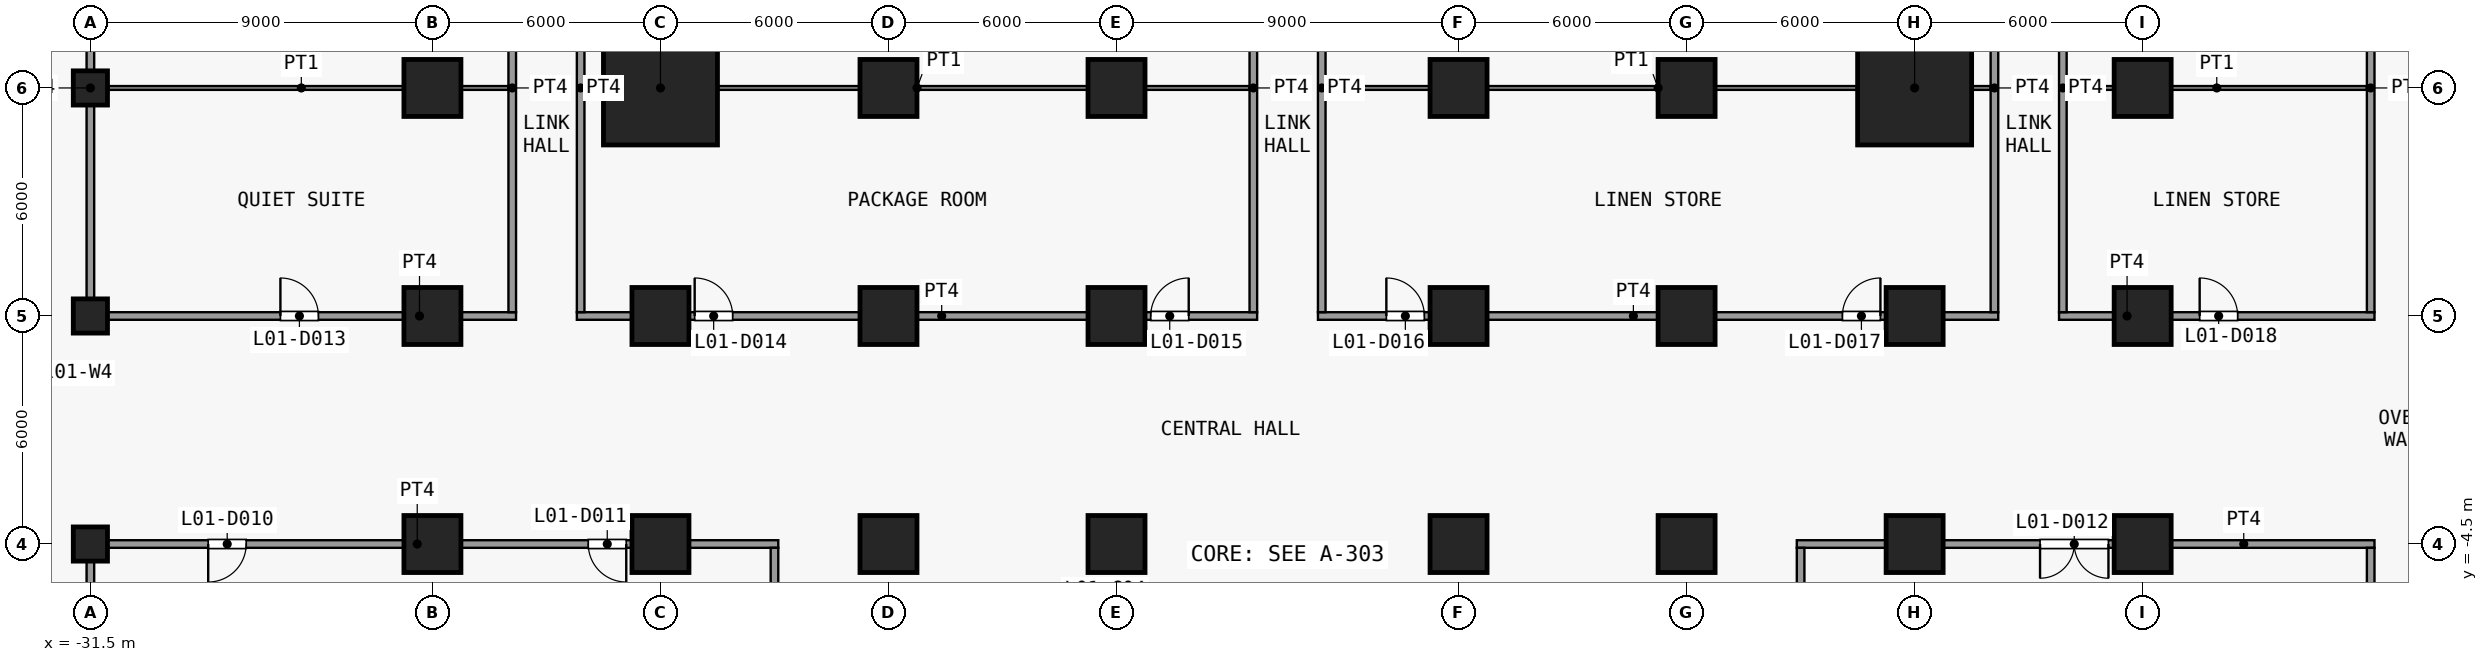
"""IFC4 building model, lengths in metres.
Left out: names, types, materials, properties, quantities, classifications, styles, units other than length and angle.
Written with IfcOpenShell. Run it as: python <this file> out.ifc"""

import sys

from ifc_helpers import new_model, si_unit, direction, frame, frame_2d, origin, origin_2d, place, context, subcontext, project, spatial, rectangle, extrude, element, fill, save


model = new_model("IFC4")
c1 = context("Model", 3, precision=1e-05, world=origin(), true_north=direction((0.0, 1.0)))
c2 = subcontext(c1, "Body", "Model", "MODEL_VIEW")
j1 = project(units=[si_unit("LENGTHUNIT", "METRE"), si_unit("PLANEANGLEUNIT", "RADIAN")], contexts=[c1])
p1 = place(None, origin())
s1 = spatial("IfcSite", under=j1, at=p1, CompositionType="ELEMENT")
p2 = place(p1, origin())
s2 = spatial("IfcBuilding", under=s1, at=p2, CompositionType="ELEMENT")
p3 = place(p2, frame((0.0, 0.0, 8.0)))
s3 = spatial("IfcBuildingStorey", under=s2, at=p3, CompositionType="ELEMENT", Elevation=8.0)
for number, where, z_axis, x_axis in (
    (1, (-31.5, -4.5, 0.0), (0.0, 0.0, 1.0), (1.0, 0.0, 0.0)),
    (2, (-31.5, 1.5, 0.0), (0.0, 0.0, 1.0), (1.0, 0.0, 0.0)),
    (3, (-31.5, 7.5, 0.0), (0.0, 0.0, 1.0), (1.0, 0.0, 0.0)),
):
    element("IfcColumn", number, at=place(p3, frame(where, z_axis=z_axis, x_axis=x_axis)), inside=s3, PredefinedType="COLUMN", context=c2, shape_type="SweptSolid", body=[
        extrude(rectangle(XDim=0.9, YDim=0.9, at=origin_2d()), origin(), (0.0, 0.0, 1.0), 5.5),
    ])
for number, where, z_axis, x_axis in (
    (4, (-22.5, -4.5, 0.0), (0.0, 0.0, 1.0), (1.0, 0.0, 0.0)),
    (5, (-22.5, 1.5, 0.0), (0.0, 0.0, 1.0), (1.0, 0.0, 0.0)),
    (6, (-22.5, 7.5, 0.0), (0.0, 0.0, 1.0), (1.0, 0.0, 0.0)),
    (7, (-16.5, -4.5, 0.0), (0.0, 0.0, 1.0), (1.0, 0.0, 0.0)),
    (8, (-16.5, 1.5, 0.0), (0.0, 0.0, 1.0), (1.0, 0.0, 0.0)),
):
    element("IfcColumn", number, at=place(p3, frame(where, z_axis=z_axis, x_axis=x_axis)), inside=s3, PredefinedType="COLUMN", context=c2, shape_type="SweptSolid", body=[
        extrude(rectangle(XDim=1.5, YDim=1.5, at=origin_2d()), origin(), (0.0, 0.0, 1.0), 5.5),
    ])
p4 = place(p3, frame((-16.5, 7.5, 0.0), z_axis=(0.0, 0.0, 1.0), x_axis=(1.0, 0.0, 0.0)))
e9 = element("IfcColumn", 9, at=p4, inside=s3, PredefinedType="COLUMN", context=c2, shape_type="SweptSolid", body=[
    extrude(rectangle(XDim=3.0, YDim=3.0, at=origin_2d()), origin(), (0.0, 0.0, 1.0), 5.5),
])
for number, where, z_axis, x_axis in (
    (10, (-10.5, -4.5, 0.0), (0.0, 0.0, 1.0), (1.0, 0.0, 0.0)),
    (11, (-10.5, 1.5, 0.0), (0.0, 0.0, 1.0), (1.0, 0.0, 0.0)),
    (12, (-10.5, 7.5, 0.0), (0.0, 0.0, 1.0), (1.0, 0.0, 0.0)),
    (13, (-4.5, -4.5, 0.0), (0.0, 0.0, 1.0), (1.0, 0.0, 0.0)),
    (14, (-4.5, 1.5, 0.0), (0.0, 0.0, 1.0), (1.0, 0.0, 0.0)),
    (15, (-4.5, 7.5, 0.0), (0.0, 0.0, 1.0), (1.0, 0.0, 0.0)),
    (16, (4.5, -4.5, 0.0), (0.0, 0.0, 1.0), (1.0, 0.0, 0.0)),
    (17, (4.5, 1.5, 0.0), (0.0, 0.0, 1.0), (1.0, 0.0, 0.0)),
    (18, (4.5, 7.5, 0.0), (0.0, 0.0, 1.0), (1.0, 0.0, 0.0)),
    (19, (10.5, -4.5, 0.0), (0.0, 0.0, 1.0), (1.0, 0.0, 0.0)),
    (20, (10.5, 1.5, 0.0), (0.0, 0.0, 1.0), (1.0, 0.0, 0.0)),
    (21, (10.5, 7.5, 0.0), (0.0, 0.0, 1.0), (1.0, 0.0, 0.0)),
    (22, (16.5, -4.5, 0.0), (0.0, 0.0, 1.0), (1.0, 0.0, 0.0)),
    (23, (16.5, 1.5, 0.0), (0.0, 0.0, 1.0), (1.0, 0.0, 0.0)),
):
    element("IfcColumn", number, at=place(p3, frame(where, z_axis=z_axis, x_axis=x_axis)), inside=s3, PredefinedType="COLUMN", context=c2, shape_type="SweptSolid", body=[
        extrude(rectangle(XDim=1.5, YDim=1.5, at=origin_2d()), origin(), (0.0, 0.0, 1.0), 5.5),
    ])
p5 = place(p3, frame((16.5, 7.5, 0.0), z_axis=(0.0, 0.0, 1.0), x_axis=(1.0, 0.0, 0.0)))
e24 = element("IfcColumn", 24, at=p5, inside=s3, PredefinedType="COLUMN", context=c2, shape_type="SweptSolid", body=[
    extrude(rectangle(XDim=3.0, YDim=3.0, at=origin_2d()), origin(), (0.0, 0.0, 1.0), 5.5),
])
for number, where, z_axis, x_axis in (
    (25, (22.5, -4.5, 0.0), (0.0, 0.0, 1.0), (1.0, 0.0, 0.0)),
    (26, (22.5, 1.5, 0.0), (0.0, 0.0, 1.0), (1.0, 0.0, 0.0)),
    (27, (22.5, 7.5, 0.0), (0.0, 0.0, 1.0), (1.0, 0.0, 0.0)),
):
    element("IfcColumn", number, at=place(p3, frame(where, z_axis=z_axis, x_axis=x_axis)), inside=s3, PredefinedType="COLUMN", context=c2, shape_type="SweptSolid", body=[
        extrude(rectangle(XDim=1.5, YDim=1.5, at=origin_2d()), origin(), (0.0, 0.0, 1.0), 5.5),
    ])
p6 = place(p3, frame((-31.6, -4.5, 0.0), z_axis=(0.0, 0.0, 1.0), x_axis=(1.0, 0.0, 0.0)))
e28 = element("IfcWall", 28, at=p6, inside=s3, PredefinedType="PARTITIONING", context=c2, shape_type="SweptSolid", body=[
    extrude(rectangle(XDim=18.2, YDim=0.2, at=frame_2d((9.1, 0.0))), origin(), (0.0, 0.0, 1.0), 5.15),
])
p7 = place(p6, frame((3.2, 0.0, 0.0)))
e29 = element("IfcOpeningElement", 29, at=p7, cuts=e28, PredefinedType="OPENING", context=c2, shape_type="SweptSolid", body=[
    extrude(rectangle(XDim=1.0, YDim=2.1, at=frame_2d((0.5, 1.05))), frame((0.0, 0.11, 0.0), z_axis=(0.0, -1.0, 0.0), x_axis=(1.0, 0.0, 0.0)), (0.0, 0.0, 1.0), 0.22),
])
p8 = place(p6, frame((13.2, 0.0, 0.0)))
e30 = element("IfcOpeningElement", 30, at=p8, cuts=e28, PredefinedType="OPENING", context=c2, shape_type="SweptSolid", body=[
    extrude(rectangle(XDim=1.0, YDim=2.1, at=frame_2d((0.5, 1.05))), frame((0.0, 0.11, 0.0), z_axis=(0.0, -1.0, 0.0), x_axis=(1.0, 0.0, 0.0)), (0.0, 0.0, 1.0), 0.22),
])
p9 = place(p3, frame((13.4, -4.5, 0.0), z_axis=(0.0, 0.0, 1.0), x_axis=(1.0, 0.0, 0.0)))
e31 = element("IfcWall", 31, at=p9, inside=s3, PredefinedType="PARTITIONING", context=c2, shape_type="SweptSolid", body=[
    extrude(rectangle(XDim=15.2, YDim=0.2, at=frame_2d((7.6, 0.0))), origin(), (0.0, 0.0, 1.0), 5.15),
])
p10 = place(p9, frame((6.4, 0.0, 0.0)))
e32 = element("IfcOpeningElement", 32, at=p10, cuts=e31, PredefinedType="OPENING", context=c2, shape_type="SweptSolid", body=[
    extrude(rectangle(XDim=1.8, YDim=2.1, at=frame_2d((0.9, 1.05))), frame((0.0, 0.11, 0.0), z_axis=(0.0, -1.0, 0.0), x_axis=(1.0, 0.0, 0.0)), (0.0, 0.0, 1.0), 0.22),
])
p11 = place(p3, frame((-31.6, 1.5, 0.0), z_axis=(0.0, 0.0, 1.0), x_axis=(1.0, 0.0, 0.0)))
e33 = element("IfcWall", 33, at=p11, inside=s3, PredefinedType="PARTITIONING", context=c2, shape_type="SweptSolid", body=[
    extrude(rectangle(XDim=11.3, YDim=0.2, at=frame_2d((5.65, 0.0))), origin(), (0.0, 0.0, 1.0), 5.15),
])
p12 = place(p11, frame((5.1, 0.0, 0.0)))
e34 = element("IfcOpeningElement", 34, at=p12, cuts=e33, PredefinedType="OPENING", context=c2, shape_type="SweptSolid", body=[
    extrude(rectangle(XDim=1.0, YDim=2.1, at=frame_2d((0.5, 1.05))), frame((0.0, 0.11, 0.0), z_axis=(0.0, -1.0, 0.0), x_axis=(1.0, 0.0, 0.0)), (0.0, 0.0, 1.0), 0.22),
])
p13 = place(p3, frame((-18.7, 1.5, 0.0), z_axis=(0.0, 0.0, 1.0), x_axis=(1.0, 0.0, 0.0)))
e35 = element("IfcWall", 35, at=p13, inside=s3, PredefinedType="PARTITIONING", context=c2, shape_type="SweptSolid", body=[
    extrude(rectangle(XDim=17.9, YDim=0.2, at=frame_2d((8.95, 0.0))), origin(), (0.0, 0.0, 1.0), 5.15),
])
p14 = place(p13, frame((3.1, 0.0, 0.0)))
e36 = element("IfcOpeningElement", 36, at=p14, cuts=e35, PredefinedType="OPENING", context=c2, shape_type="SweptSolid", body=[
    extrude(rectangle(XDim=1.0, YDim=2.1, at=frame_2d((0.5, 1.05))), frame((0.0, 0.11, 0.0), z_axis=(0.0, -1.0, 0.0), x_axis=(1.0, 0.0, 0.0)), (0.0, 0.0, 1.0), 0.22),
])
p15 = place(p13, frame((15.1, 0.0, 0.0)))
e37 = element("IfcOpeningElement", 37, at=p15, cuts=e35, PredefinedType="OPENING", context=c2, shape_type="SweptSolid", body=[
    extrude(rectangle(XDim=1.0, YDim=2.1, at=frame_2d((0.5, 1.05))), frame((0.0, 0.11, 0.0), z_axis=(0.0, -1.0, 0.0), x_axis=(1.0, 0.0, 0.0)), (0.0, 0.0, 1.0), 0.22),
])
p16 = place(p3, frame((0.8, 1.5, 0.0), z_axis=(0.0, 0.0, 1.0), x_axis=(1.0, 0.0, 0.0)))
e38 = element("IfcWall", 38, at=p16, inside=s3, PredefinedType="PARTITIONING", context=c2, shape_type="SweptSolid", body=[
    extrude(rectangle(XDim=17.9, YDim=0.2, at=frame_2d((8.95, 0.0))), origin(), (0.0, 0.0, 1.0), 5.15),
])
p17 = place(p16, frame((1.8, 0.0, 0.0)))
e39 = element("IfcOpeningElement", 39, at=p17, cuts=e38, PredefinedType="OPENING", context=c2, shape_type="SweptSolid", body=[
    extrude(rectangle(XDim=1.0, YDim=2.1, at=frame_2d((0.5, 1.05))), frame((0.0, 0.11, 0.0), z_axis=(0.0, -1.0, 0.0), x_axis=(1.0, 0.0, 0.0)), (0.0, 0.0, 1.0), 0.22),
])
p18 = place(p16, frame((13.8, 0.0, 0.0)))
e40 = element("IfcOpeningElement", 40, at=p18, cuts=e38, PredefinedType="OPENING", context=c2, shape_type="SweptSolid", body=[
    extrude(rectangle(XDim=1.0, YDim=2.1, at=frame_2d((0.5, 1.05))), frame((0.0, 0.11, 0.0), z_axis=(0.0, -1.0, 0.0), x_axis=(1.0, 0.0, 0.0)), (0.0, 0.0, 1.0), 0.22),
])
p19 = place(p3, frame((20.3, 1.5, 0.0), z_axis=(0.0, 0.0, 1.0), x_axis=(1.0, 0.0, 0.0)))
e41 = element("IfcWall", 41, at=p19, inside=s3, PredefinedType="PARTITIONING", context=c2, shape_type="SweptSolid", body=[
    extrude(rectangle(XDim=8.3, YDim=0.2, at=frame_2d((4.15, 0.0))), origin(), (0.0, 0.0, 1.0), 5.15),
])
p20 = place(p19, frame((3.7, 0.0, 0.0)))
e42 = element("IfcOpeningElement", 42, at=p20, cuts=e41, PredefinedType="OPENING", context=c2, shape_type="SweptSolid", body=[
    extrude(rectangle(XDim=1.0, YDim=2.1, at=frame_2d((0.5, 1.05))), frame((0.0, 0.11, 0.0), z_axis=(0.0, -1.0, 0.0), x_axis=(1.0, 0.0, 0.0)), (0.0, 0.0, 1.0), 0.22),
])
p21 = place(p3, frame((-31.4, 7.5, 0.0), z_axis=(0.0, 0.0, 1.0), x_axis=(1.0, 0.0, 0.0)))
e43 = element("IfcWall", 43, at=p21, inside=s3, PredefinedType="PARTITIONING", context=c2, shape_type="SweptSolid", body=[
    extrude(rectangle(XDim=10.9, YDim=0.1, at=frame_2d((5.45, 0.0))), origin(), (0.0, 0.0, 1.0), 5.15),
])
for number, where, z_axis, x_axis in (
    (44, (-18.5, 7.5, 0.0), (0.0, 0.0, 1.0), (1.0, 0.0, 0.0)),
    (45, (1.0, 7.5, 0.0), (0.0, 0.0, 1.0), (1.0, 0.0, 0.0)),
):
    element("IfcWall", number, at=place(p3, frame(where, z_axis=z_axis, x_axis=x_axis)), inside=s3, PredefinedType="PARTITIONING", context=c2, shape_type="SweptSolid", body=[
        extrude(rectangle(XDim=17.5, YDim=0.1, at=frame_2d((8.75, 0.0))), origin(), (0.0, 0.0, 1.0), 5.15),
    ])
p22 = place(p3, frame((20.5, 7.5, 0.0), z_axis=(0.0, 0.0, 1.0), x_axis=(1.0, 0.0, 0.0)))
e46 = element("IfcWall", 46, at=p22, inside=s3, PredefinedType="PARTITIONING", context=c2, shape_type="SweptSolid", body=[
    extrude(rectangle(XDim=7.9, YDim=0.1, at=frame_2d((3.95, 0.0))), origin(), (0.0, 0.0, 1.0), 5.15),
])
p23 = place(p3, frame((-31.5, -19.4, 0.0), z_axis=(0.0, 0.0, 1.0), x_axis=(0.0, 1.0, 0.0)))
e47 = element("IfcWall", 47, at=p23, inside=s3, PredefinedType="PARTITIONING", context=c2, shape_type="SweptSolid", body=[
    extrude(rectangle(XDim=14.8, YDim=0.2, at=frame_2d((7.4, 0.0))), origin(), (0.0, 0.0, 1.0), 5.15),
])
for number, where, z_axis, x_axis in (
    (48, (-31.5, 1.6, 0.0), (0.0, 0.0, 1.0), (0.0, 1.0, 0.0)),
    (49, (-20.4, 1.6, 0.0), (0.0, 0.0, 1.0), (0.0, 1.0, 0.0)),
    (50, (-18.6, 1.6, 0.0), (0.0, 0.0, 1.0), (0.0, 1.0, 0.0)),
):
    element("IfcWall", number, at=place(p3, frame(where, z_axis=z_axis, x_axis=x_axis)), inside=s3, PredefinedType="PARTITIONING", context=c2, shape_type="SweptSolid", body=[
        extrude(rectangle(XDim=11.8, YDim=0.2, at=frame_2d((5.9, 0.0))), origin(), (0.0, 0.0, 1.0), 5.15),
    ])
p24 = place(p3, frame((-13.5, -7.9, 0.0), z_axis=(0.0, 0.0, 1.0), x_axis=(0.0, 1.0, 0.0)))
e51 = element("IfcWall", 51, at=p24, inside=s3, PredefinedType="PARTITIONING", context=c2, shape_type="SweptSolid", body=[
    extrude(rectangle(XDim=3.3, YDim=0.2, at=frame_2d((1.65, 0.0))), origin(), (0.0, 0.0, 1.0), 5.15),
])
for number, where, z_axis, x_axis in (
    (52, (-0.9, 1.6, 0.0), (0.0, 0.0, 1.0), (0.0, 1.0, 0.0)),
    (53, (0.9, 1.6, 0.0), (0.0, 0.0, 1.0), (0.0, 1.0, 0.0)),
):
    element("IfcWall", number, at=place(p3, frame(where, z_axis=z_axis, x_axis=x_axis)), inside=s3, PredefinedType="PARTITIONING", context=c2, shape_type="SweptSolid", body=[
        extrude(rectangle(XDim=11.8, YDim=0.2, at=frame_2d((5.9, 0.0))), origin(), (0.0, 0.0, 1.0), 5.15),
    ])
p25 = place(p3, frame((13.5, -7.9, 0.0), z_axis=(0.0, 0.0, 1.0), x_axis=(0.0, 1.0, 0.0)))
e54 = element("IfcWall", 54, at=p25, inside=s3, PredefinedType="PARTITIONING", context=c2, shape_type="SweptSolid", body=[
    extrude(rectangle(XDim=3.3, YDim=0.2, at=frame_2d((1.65, 0.0))), origin(), (0.0, 0.0, 1.0), 5.15),
])
for number, where, z_axis, x_axis in (
    (55, (18.6, 1.6, 0.0), (0.0, 0.0, 1.0), (0.0, 1.0, 0.0)),
    (56, (20.4, 1.6, 0.0), (0.0, 0.0, 1.0), (0.0, 1.0, 0.0)),
):
    element("IfcWall", number, at=place(p3, frame(where, z_axis=z_axis, x_axis=x_axis)), inside=s3, PredefinedType="PARTITIONING", context=c2, shape_type="SweptSolid", body=[
        extrude(rectangle(XDim=11.8, YDim=0.2, at=frame_2d((5.9, 0.0))), origin(), (0.0, 0.0, 1.0), 5.15),
    ])
p26 = place(p3, frame((28.5, -19.4, 0.0), z_axis=(0.0, 0.0, 1.0), x_axis=(0.0, 1.0, 0.0)))
e57 = element("IfcWall", 57, at=p26, inside=s3, PredefinedType="PARTITIONING", context=c2, shape_type="SweptSolid", body=[
    extrude(rectangle(XDim=14.8, YDim=0.2, at=frame_2d((7.4, 0.0))), origin(), (0.0, 0.0, 1.0), 5.15),
])
p27 = place(p3, frame((28.5, 1.6, 0.0), z_axis=(0.0, 0.0, 1.0), x_axis=(0.0, 1.0, 0.0)))
e58 = element("IfcWall", 58, at=p27, inside=s3, PredefinedType="PARTITIONING", context=c2, shape_type="SweptSolid", body=[
    extrude(rectangle(XDim=11.8, YDim=0.2, at=frame_2d((5.9, 0.0))), origin(), (0.0, 0.0, 1.0), 5.15),
])
p28 = place(p7, origin())
e59 = element("IfcDoor", 59, at=p28, inside=s3, OperationType="SINGLE_SWING_LEFT", PredefinedType="DOOR", context=c2, shape_type="SweptSolid", body=[
    extrude(rectangle(XDim=1.0, YDim=2.1, at=frame_2d((0.5, 1.05))), frame((0.0, 0.025, 0.0), z_axis=(0.0, -1.0, 0.0), x_axis=(1.0, 0.0, 0.0)), (0.0, 0.0, 1.0), 0.05),
])
fill(e29, e59)
p29 = place(p8, origin())
e60 = element("IfcDoor", 60, at=p29, inside=s3, OperationType="SINGLE_SWING_RIGHT", PredefinedType="DOOR", context=c2, shape_type="SweptSolid", body=[
    extrude(rectangle(XDim=1.0, YDim=2.1, at=frame_2d((0.5, 1.05))), frame((0.0, 0.025, 0.0), z_axis=(0.0, -1.0, 0.0), x_axis=(1.0, 0.0, 0.0)), (0.0, 0.0, 1.0), 0.05),
])
fill(e30, e60)
p30 = place(p10, origin())
e61 = element("IfcDoor", 61, at=p30, inside=s3, OperationType="DOUBLE_DOOR_SINGLE_SWING", PredefinedType="DOOR", context=c2, shape_type="SweptSolid", body=[
    extrude(rectangle(XDim=1.8, YDim=2.1, at=frame_2d((0.9, 1.05))), frame((0.0, 0.025, 0.0), z_axis=(0.0, -1.0, 0.0), x_axis=(1.0, 0.0, 0.0)), (0.0, 0.0, 1.0), 0.05),
])
fill(e32, e61)
p31 = place(p12, origin())
e62 = element("IfcDoor", 62, at=p31, inside=s3, OperationType="SINGLE_SWING_RIGHT", PredefinedType="DOOR", context=c2, shape_type="SweptSolid", body=[
    extrude(rectangle(XDim=1.0, YDim=2.1, at=frame_2d((0.5, 1.05))), frame((0.0, 0.025, 0.0), z_axis=(0.0, -1.0, 0.0), x_axis=(1.0, 0.0, 0.0)), (0.0, 0.0, 1.0), 0.05),
])
fill(e34, e62)
p32 = place(p14, origin())
e63 = element("IfcDoor", 63, at=p32, inside=s3, OperationType="SINGLE_SWING_RIGHT", PredefinedType="DOOR", context=c2, shape_type="SweptSolid", body=[
    extrude(rectangle(XDim=1.0, YDim=2.1, at=frame_2d((0.5, 1.05))), frame((0.0, 0.025, 0.0), z_axis=(0.0, -1.0, 0.0), x_axis=(1.0, 0.0, 0.0)), (0.0, 0.0, 1.0), 0.05),
])
fill(e36, e63)
p33 = place(p15, origin())
e64 = element("IfcDoor", 64, at=p33, inside=s3, OperationType="SINGLE_SWING_LEFT", PredefinedType="DOOR", context=c2, shape_type="SweptSolid", body=[
    extrude(rectangle(XDim=1.0, YDim=2.1, at=frame_2d((0.5, 1.05))), frame((0.0, 0.025, 0.0), z_axis=(0.0, -1.0, 0.0), x_axis=(1.0, 0.0, 0.0)), (0.0, 0.0, 1.0), 0.05),
])
fill(e37, e64)
p34 = place(p17, origin())
e65 = element("IfcDoor", 65, at=p34, inside=s3, OperationType="SINGLE_SWING_RIGHT", PredefinedType="DOOR", context=c2, shape_type="SweptSolid", body=[
    extrude(rectangle(XDim=1.0, YDim=2.1, at=frame_2d((0.5, 1.05))), frame((0.0, 0.025, 0.0), z_axis=(0.0, -1.0, 0.0), x_axis=(1.0, 0.0, 0.0)), (0.0, 0.0, 1.0), 0.05),
])
fill(e39, e65)
p35 = place(p18, origin())
e66 = element("IfcDoor", 66, at=p35, inside=s3, OperationType="SINGLE_SWING_LEFT", PredefinedType="DOOR", context=c2, shape_type="SweptSolid", body=[
    extrude(rectangle(XDim=1.0, YDim=2.1, at=frame_2d((0.5, 1.05))), frame((0.0, 0.025, 0.0), z_axis=(0.0, -1.0, 0.0), x_axis=(1.0, 0.0, 0.0)), (0.0, 0.0, 1.0), 0.05),
])
fill(e40, e66)
p36 = place(p20, origin())
e67 = element("IfcDoor", 67, at=p36, inside=s3, OperationType="SINGLE_SWING_RIGHT", PredefinedType="DOOR", context=c2, shape_type="SweptSolid", body=[
    extrude(rectangle(XDim=1.0, YDim=2.1, at=frame_2d((0.5, 1.05))), frame((0.0, 0.025, 0.0), z_axis=(0.0, -1.0, 0.0), x_axis=(1.0, 0.0, 0.0)), (0.0, 0.0, 1.0), 0.05),
])
fill(e42, e67)
save(model, sys.argv[1])
